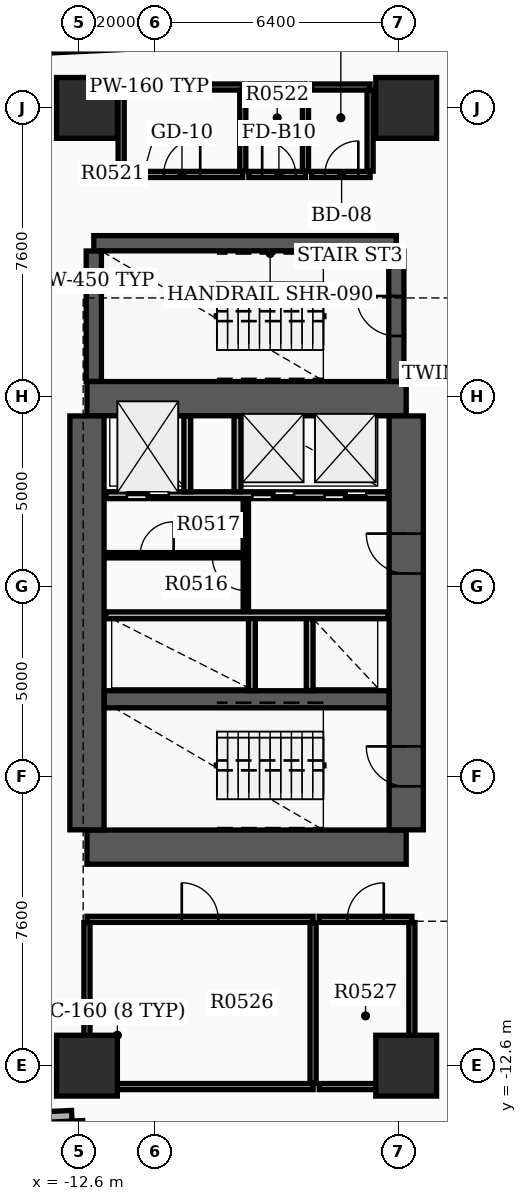
"""IFC4 building model, lengths in metres.
Left out: names, types, materials, properties, quantities, classifications, styles, units other than length and angle.
Written with IfcOpenShell. Run it as: python <this file> out.ifc"""

import sys

from ifc_helpers import new_model, si_unit, direction, frame, frame_2d, origin, origin_2d, place, context, subcontext, project, spatial, rectangle, extrude, element, fill, save


model = new_model("IFC4")
c1 = context("Model", 3, precision=1e-05, world=origin(), true_north=direction((0.0, 1.0)))
c2 = subcontext(c1, "Body", "Model", "MODEL_VIEW")
j1 = project(units=[si_unit("LENGTHUNIT", "METRE"), si_unit("PLANEANGLEUNIT", "RADIAN")], contexts=[c1])
p1 = place(None, origin())
s1 = spatial("IfcSite", under=j1, at=p1, CompositionType="ELEMENT")
p2 = place(p1, origin())
s2 = spatial("IfcBuilding", under=s1, at=p2, CompositionType="ELEMENT")
p3 = place(p2, frame((0.0, 0.0, 35.4)))
s3 = spatial("IfcBuildingStorey", under=s2, at=p3, CompositionType="ELEMENT", Elevation=35.4)
for number, where, z_axis, x_axis in (
    (1, (-12.4, -6.85, 0.0), (0.0, 0.0, 1.0), (1.0, 0.0, 0.0)),
    (2, (-12.4, 4.95, 0.0), (0.0, 0.0, 1.0), (1.0, 0.0, 0.0)),
):
    element("IfcWall", number, at=place(p3, frame(where, z_axis=z_axis, x_axis=x_axis)), inside=s3, PredefinedType="SHEAR", context=c2, shape_type="SweptSolid", body=[
        extrude(rectangle(XDim=8.4, YDim=0.9, at=frame_2d((4.2, 0.0))), origin(), (0.0, 0.0, 1.0), 3.7),
    ])
p4 = place(p3, frame((-12.4, -6.395, 0.0), z_axis=(0.0, 0.0, 1.0), x_axis=(0.0, 1.0, 0.0)))
e3 = element("IfcWall", 3, at=p4, inside=s3, PredefinedType="SHEAR", context=c2, shape_type="SweptSolid", body=[
    extrude(rectangle(XDim=10.89, YDim=0.9, at=frame_2d((5.445, 0.0))), origin(), (0.0, 0.0, 1.0), 3.7),
])
p5 = place(p3, frame((-4.0, -6.395, 0.0), z_axis=(0.0, 0.0, 1.0), x_axis=(0.0, 1.0, 0.0)))
e4 = element("IfcWall", 4, at=p5, inside=s3, PredefinedType="SHEAR", context=c2, shape_type="SweptSolid", body=[
    extrude(rectangle(XDim=10.89, YDim=0.9, at=frame_2d((5.445, 0.0))), origin(), (0.0, 0.0, 1.0), 3.7),
])
p6 = place(p5, frame((1.145, 0.0, 0.0)))
e5 = element("IfcOpeningElement", 5, at=p6, cuts=e4, PredefinedType="OPENING", context=c2, shape_type="SweptSolid", body=[
    extrude(rectangle(XDim=1.05, YDim=2.15, at=frame_2d((0.525, 1.075))), frame((0.0, 0.46, 0.0), z_axis=(0.0, -1.0, 0.0), x_axis=(1.0, 0.0, 0.0)), (0.0, 0.0, 1.0), 0.92),
])
p7 = place(p5, frame((6.745, 0.0, 0.0)))
e6 = element("IfcOpeningElement", 6, at=p7, cuts=e4, PredefinedType="OPENING", context=c2, shape_type="SweptSolid", body=[
    extrude(rectangle(XDim=1.05, YDim=2.15, at=frame_2d((0.525, 1.075))), frame((0.0, 0.46, 0.0), z_axis=(0.0, -1.0, 0.0), x_axis=(1.0, 0.0, 0.0)), (0.0, 0.0, 1.0), 0.92),
])
p8 = place(p3, frame((-11.945, -2.96, 0.0), z_axis=(0.0, 0.0, 1.0), x_axis=(1.0, 0.0, 0.0)))
e7 = element("IfcWall", 7, at=p8, inside=s3, PredefinedType="SHEAR", context=c2, shape_type="SweptSolid", body=[
    extrude(rectangle(XDim=7.49, YDim=0.45, at=frame_2d((3.745, 0.0))), origin(), (0.0, 0.0, 1.0), 3.7),
])
p9 = place(p3, frame((-12.22, 9.04, 0.0), z_axis=(0.0, 0.0, 1.0), x_axis=(1.0, 0.0, 0.0)))
e8 = element("IfcWall", 8, at=p9, inside=s3, PredefinedType="SHEAR", context=c2, shape_type="SweptSolid", body=[
    extrude(rectangle(XDim=7.96, YDim=0.4, at=frame_2d((3.98, 0.0))), origin(), (0.0, 0.0, 1.0), 3.7),
])
p10 = place(p3, frame((-12.22, 5.405, 0.0), z_axis=(0.0, 0.0, 1.0), x_axis=(0.0, 1.0, 0.0)))
e9 = element("IfcWall", 9, at=p10, inside=s3, PredefinedType="SHEAR", context=c2, shape_type="SweptSolid", body=[
    extrude(rectangle(XDim=3.43, YDim=0.4, at=frame_2d((1.715, 0.0))), origin(), (0.0, 0.0, 1.0), 3.7),
])
p11 = place(p3, frame((-4.26, 5.405, 0.0), z_axis=(0.0, 0.0, 1.0), x_axis=(0.0, 1.0, 0.0)))
e10 = element("IfcWall", 10, at=p11, inside=s3, PredefinedType="SHEAR", context=c2, shape_type="SweptSolid", body=[
    extrude(rectangle(XDim=3.43, YDim=0.4, at=frame_2d((1.715, 0.0))), origin(), (0.0, 0.0, 1.0), 3.7),
])
p12 = place(p11, frame((1.195, 0.0, 0.0)))
e11 = element("IfcOpeningElement", 11, at=p12, cuts=e10, PredefinedType="OPENING", context=c2, shape_type="SweptSolid", body=[
    extrude(rectangle(XDim=1.05, YDim=2.15, at=frame_2d((0.525, 1.075))), frame((0.0, 0.21, 0.0), z_axis=(0.0, -1.0, 0.0), x_axis=(1.0, 0.0, 0.0)), (0.0, 0.0, 1.0), 0.42),
])
for number, where, z_axis, x_axis in (
    (12, (-12.4, -12.6, 0.0), (0.0, 0.0, 1.0), (1.0, 0.0, 0.0)),
    (13, (-12.4, 12.6, 0.0), (0.0, 0.0, 1.0), (1.0, 0.0, 0.0)),
    (14, (-4.0, -12.6, 0.0), (0.0, 0.0, 1.0), (1.0, 0.0, 0.0)),
    (15, (-4.0, 12.6, 0.0), (0.0, 0.0, 1.0), (1.0, 0.0, 0.0)),
):
    element("IfcColumn", number, at=place(p3, frame(where, z_axis=z_axis, x_axis=x_axis)), inside=s3, PredefinedType="COLUMN", context=c2, shape_type="SweptSolid", body=[
        extrude(rectangle(XDim=1.6, YDim=1.6, at=origin_2d()), origin(), (0.0, 0.0, 1.0), 3.9),
    ])
p13 = place(p3, frame((-13.843, 14.164, 0.0), z_axis=(0.0, 0.0, 1.0), x_axis=(0.998889082162, 0.047123258997, 0.0)))
e16 = element("IfcWall", 16, at=p13, inside=s3, PredefinedType="STANDARD", context=c2, shape_type="SweptSolid", body=[
    extrude(rectangle(XDim=6.3, YDim=0.28, at=frame_2d((3.15, 0.0))), origin(), (0.0, 0.0, 1.0), 2.91),
])
p14 = place(p3, frame((-14.017, -13.976, 0.0), z_axis=(0.0, 0.0, 1.0), x_axis=(0.998883930236, 0.047232339719, 0.0)))
e17 = element("IfcWall", 17, at=p14, inside=s3, PredefinedType="STANDARD", context=c2, shape_type="SweptSolid", body=[
    extrude(rectangle(XDim=1.22, YDim=0.28, at=frame_2d((0.61, 0.0))), origin(), (0.0, 0.0, 1.0), 2.91),
])
p15 = place(p3, frame((-12.652, -14.052, 0.0), z_axis=(0.0, 0.0, 1.0), x_axis=(0.047039284441, -0.99889304018, 0.0)))
e18 = element("IfcWall", 18, at=p15, inside=s3, PredefinedType="STANDARD", context=c2, shape_type="SweptSolid", body=[
    extrude(rectangle(XDim=1.5, YDim=0.28, at=frame_2d((0.75, 0.0))), origin(), (0.0, 0.0, 1.0), 2.91),
])
p16 = place(p3, frame((-11.9, 2.41, 0.0), z_axis=(0.0, 0.0, 1.0), x_axis=(1.0, 0.0, 0.0)))
e19 = element("IfcWall", 19, at=p16, inside=s3, PredefinedType="SOLIDWALL", context=c2, shape_type="SweptSolid", body=[
    extrude(rectangle(XDim=7.42, YDim=0.18, at=frame_2d((3.71, 0.0))), origin(), (0.0, 0.0, 1.0), 2.9),
])
p17 = place(p16, frame((0.55, 0.0, 0.0)))
e20 = element("IfcOpeningElement", 20, at=p17, cuts=e19, PredefinedType="OPENING", context=c2, shape_type="SweptSolid", body=[
    extrude(rectangle(XDim=1.1, YDim=2.15, at=frame_2d((0.55, 1.075))), frame((0.0, 0.1, 0.0), z_axis=(0.0, -1.0, 0.0), x_axis=(1.0, 0.0, 0.0)), (0.0, 0.0, 1.0), 0.2),
])
p18 = place(p16, frame((3.85, 0.0, 0.0)))
e21 = element("IfcOpeningElement", 21, at=p18, cuts=e19, PredefinedType="OPENING", context=c2, shape_type="SweptSolid", body=[
    extrude(rectangle(XDim=1.1, YDim=2.15, at=frame_2d((0.55, 1.075))), frame((0.0, 0.1, 0.0), z_axis=(0.0, -1.0, 0.0), x_axis=(1.0, 0.0, 0.0)), (0.0, 0.0, 1.0), 0.2),
])
p19 = place(p16, frame((5.75, 0.0, 0.0)))
e22 = element("IfcOpeningElement", 22, at=p19, cuts=e19, PredefinedType="OPENING", context=c2, shape_type="SweptSolid", body=[
    extrude(rectangle(XDim=1.1, YDim=2.15, at=frame_2d((0.55, 1.075))), frame((0.0, 0.1, 0.0), z_axis=(0.0, -1.0, 0.0), x_axis=(1.0, 0.0, 0.0)), (0.0, 0.0, 1.0), 0.2),
])
p20 = place(p3, frame((-11.9, -0.75, 0.0), z_axis=(0.0, 0.0, 1.0), x_axis=(1.0, 0.0, 0.0)))
e23 = element("IfcWall", 23, at=p20, inside=s3, PredefinedType="SOLIDWALL", context=c2, shape_type="SweptSolid", body=[
    extrude(rectangle(XDim=7.42, YDim=0.18, at=frame_2d((3.71, 0.0))), origin(), (0.0, 0.0, 1.0), 2.9),
])
for number, where, z_axis, x_axis in (
    (24, (-9.76, 2.5, 0.0), (0.0, 0.0, 1.0), (0.0, 1.0, 0.0)),
    (25, (-8.44, 2.5, 0.0), (0.0, 0.0, 1.0), (0.0, 1.0, 0.0)),
):
    element("IfcWall", number, at=place(p3, frame(where, z_axis=z_axis, x_axis=x_axis)), inside=s3, PredefinedType="SOLIDWALL", context=c2, shape_type="SweptSolid", body=[
        extrude(rectangle(XDim=1.99, YDim=0.18, at=frame_2d((0.995, 0.0))), origin(), (0.0, 0.0, 1.0), 2.9),
    ])
for number, where, z_axis, x_axis in (
    (26, (-8.06, -2.73, 0.0), (0.0, 0.0, 1.0), (0.0, 1.0, 0.0)),
    (27, (-6.54, -2.73, 0.0), (0.0, 0.0, 1.0), (0.0, 1.0, 0.0)),
):
    element("IfcWall", number, at=place(p3, frame(where, z_axis=z_axis, x_axis=x_axis)), inside=s3, PredefinedType="SOLIDWALL", context=c2, shape_type="SweptSolid", body=[
        extrude(rectangle(XDim=1.89, YDim=0.18, at=frame_2d((0.945, 0.0))), origin(), (0.0, 0.0, 1.0), 2.9),
    ])
p21 = place(p3, frame((-8.22, -0.65, 0.0), z_axis=(0.0, 0.0, 1.0), x_axis=(0.0, 1.0, 0.0)))
e28 = element("IfcWall", 28, at=p21, inside=s3, PredefinedType="SOLIDWALL", context=c2, shape_type="SweptSolid", body=[
    extrude(rectangle(XDim=2.96, YDim=0.14, at=frame_2d((1.48, 0.0))), origin(), (0.0, 0.0, 1.0), 2.9),
])
p22 = place(p21, frame((0.55, 0.0, 0.0)))
e29 = element("IfcOpeningElement", 29, at=p22, cuts=e28, PredefinedType="OPENING", context=c2, shape_type="SweptSolid", body=[
    extrude(rectangle(XDim=0.88, YDim=2.1, at=frame_2d((0.44, 1.05))), frame((0.0, 0.08, 0.0), z_axis=(0.0, -1.0, 0.0), x_axis=(1.0, 0.0, 0.0)), (0.0, 0.0, 1.0), 0.16),
])
p23 = place(p3, frame((-11.85, 0.83, 0.0), z_axis=(0.0, 0.0, 1.0), x_axis=(1.0, 0.0, 0.0)))
e30 = element("IfcWall", 30, at=p23, inside=s3, PredefinedType="PARTITIONING", context=c2, shape_type="SweptSolid", body=[
    extrude(rectangle(XDim=3.552, YDim=0.14, at=frame_2d((1.776, 0.0))), origin(), (0.0, 0.0, 1.0), 2.9),
])
p24 = place(p23, frame((0.85, 0.0, 0.0)))
e31 = element("IfcOpeningElement", 31, at=p24, cuts=e30, PredefinedType="OPENING", context=c2, shape_type="SweptSolid", body=[
    extrude(rectangle(XDim=0.88, YDim=2.1, at=frame_2d((0.44, 1.05))), frame((0.0, 0.08, 0.0), z_axis=(0.0, -1.0, 0.0), x_axis=(1.0, 0.0, 0.0)), (0.0, 0.0, 1.0), 0.16),
])
p25 = place(p3, frame((-11.5, 10.85, 0.0), z_axis=(0.0, 0.0, 1.0), x_axis=(1.0, 0.0, 0.0)))
e32 = element("IfcWall", 32, at=p25, inside=s3, PredefinedType="PARTITIONING", context=c2, shape_type="SweptSolid", body=[
    extrude(rectangle(XDim=3.2, YDim=0.16, at=frame_2d((1.6, 0.0))), origin(), (0.0, 0.0, 1.0), 2.9),
])
p26 = place(p25, frame((1.12, 0.0, 0.0)))
e33 = element("IfcOpeningElement", 33, at=p26, cuts=e32, PredefinedType="OPENING", context=c2, shape_type="SweptSolid", body=[
    extrude(rectangle(XDim=0.96, YDim=2.15, at=frame_2d((0.48, 1.075))), frame((0.0, 0.09, 0.0), z_axis=(0.0, -1.0, 0.0), x_axis=(1.0, 0.0, 0.0)), (0.0, 0.0, 1.0), 0.18),
])
p27 = place(p3, frame((-11.5, 13.15, 0.0), z_axis=(0.0, 0.0, 1.0), x_axis=(1.0, 0.0, 0.0)))
e34 = element("IfcWall", 34, at=p27, inside=s3, PredefinedType="PARTITIONING", context=c2, shape_type="SweptSolid", body=[
    extrude(rectangle(XDim=3.2, YDim=0.16, at=frame_2d((1.6, 0.0))), origin(), (0.0, 0.0, 1.0), 2.9),
])
for number, where, z_axis, x_axis in (
    (35, (-11.5, 10.935, 0.0), (0.0, 0.0, 1.0), (0.0, 1.0, 0.0)),
    (36, (-8.3, 10.935, 0.0), (0.0, 0.0, 1.0), (0.0, 1.0, 0.0)),
):
    element("IfcWall", number, at=place(p3, frame(where, z_axis=z_axis, x_axis=x_axis)), inside=s3, PredefinedType="PARTITIONING", context=c2, shape_type="SweptSolid", body=[
        extrude(rectangle(XDim=2.13, YDim=0.16, at=frame_2d((1.065, 0.0))), origin(), (0.0, 0.0, 1.0), 2.9),
    ])
p28 = place(p3, frame((-8.14, 10.85, 0.0), z_axis=(0.0, 0.0, 1.0), x_axis=(1.0, 0.0, 0.0)))
e37 = element("IfcWall", 37, at=p28, inside=s3, PredefinedType="PARTITIONING", context=c2, shape_type="SweptSolid", body=[
    extrude(rectangle(XDim=1.49, YDim=0.16, at=frame_2d((0.745, 0.0))), origin(), (0.0, 0.0, 1.0), 2.9),
])
p29 = place(p28, frame((0.35, 0.0, 0.0)))
e38 = element("IfcOpeningElement", 38, at=p29, cuts=e37, PredefinedType="OPENING", context=c2, shape_type="SweptSolid", body=[
    extrude(rectangle(XDim=0.88, YDim=2.1, at=frame_2d((0.44, 1.05))), frame((0.0, 0.09, 0.0), z_axis=(0.0, -1.0, 0.0), x_axis=(1.0, 0.0, 0.0)), (0.0, 0.0, 1.0), 0.18),
])
p30 = place(p3, frame((-8.14, 13.15, 0.0), z_axis=(0.0, 0.0, 1.0), x_axis=(1.0, 0.0, 0.0)))
e39 = element("IfcWall", 39, at=p30, inside=s3, PredefinedType="PARTITIONING", context=c2, shape_type="SweptSolid", body=[
    extrude(rectangle(XDim=1.49, YDim=0.16, at=frame_2d((0.745, 0.0))), origin(), (0.0, 0.0, 1.0), 2.9),
])
p31 = place(p3, frame((-6.65, 10.935, 0.0), z_axis=(0.0, 0.0, 1.0), x_axis=(0.0, 1.0, 0.0)))
e40 = element("IfcWall", 40, at=p31, inside=s3, PredefinedType="PARTITIONING", context=c2, shape_type="SweptSolid", body=[
    extrude(rectangle(XDim=2.13, YDim=0.16, at=frame_2d((1.065, 0.0))), origin(), (0.0, 0.0, 1.0), 2.9),
])
p32 = place(p3, frame((-6.49, 10.85, 0.0), z_axis=(0.0, 0.0, 1.0), x_axis=(1.0, 0.0, 0.0)))
e41 = element("IfcWall", 41, at=p32, inside=s3, PredefinedType="PARTITIONING", context=c2, shape_type="SweptSolid", body=[
    extrude(rectangle(XDim=1.54, YDim=0.16, at=frame_2d((0.77, 0.0))), origin(), (0.0, 0.0, 1.0), 2.9),
])
p33 = place(p32, frame((0.35, 0.0, 0.0)))
e42 = element("IfcOpeningElement", 42, at=p33, cuts=e41, PredefinedType="OPENING", context=c2, shape_type="SweptSolid", body=[
    extrude(rectangle(XDim=0.88, YDim=2.15, at=frame_2d((0.44, 1.075))), frame((0.0, 0.09, 0.0), z_axis=(0.0, -1.0, 0.0), x_axis=(1.0, 0.0, 0.0)), (0.0, 0.0, 1.0), 0.18),
])
p34 = place(p3, frame((-6.49, 13.15, 0.0), z_axis=(0.0, 0.0, 1.0), x_axis=(1.0, 0.0, 0.0)))
e43 = element("IfcWall", 43, at=p34, inside=s3, PredefinedType="PARTITIONING", context=c2, shape_type="SweptSolid", body=[
    extrude(rectangle(XDim=1.54, YDim=0.16, at=frame_2d((0.77, 0.0))), origin(), (0.0, 0.0, 1.0), 2.9),
])
p35 = place(p3, frame((-4.95, 10.935, 0.0), z_axis=(0.0, 0.0, 1.0), x_axis=(0.0, 1.0, 0.0)))
e44 = element("IfcWall", 44, at=p35, inside=s3, PredefinedType="PARTITIONING", context=c2, shape_type="SweptSolid", body=[
    extrude(rectangle(XDim=2.13, YDim=0.16, at=frame_2d((1.065, 0.0))), origin(), (0.0, 0.0, 1.0), 2.9),
])
p36 = place(p3, frame((-12.4, -13.15, 0.0), z_axis=(0.0, 0.0, 1.0), x_axis=(1.0, 0.0, 0.0)))
e45 = element("IfcWall", 45, at=p36, inside=s3, PredefinedType="PARTITIONING", context=c2, shape_type="SweptSolid", body=[
    extrude(rectangle(XDim=5.95, YDim=0.16, at=frame_2d((2.975, 0.0))), origin(), (0.0, 0.0, 1.0), 2.9),
])
p37 = place(p3, frame((-12.4, -8.75, 0.0), z_axis=(0.0, 0.0, 1.0), x_axis=(1.0, 0.0, 0.0)))
e46 = element("IfcWall", 46, at=p37, inside=s3, PredefinedType="PARTITIONING", context=c2, shape_type="SweptSolid", body=[
    extrude(rectangle(XDim=5.95, YDim=0.16, at=frame_2d((2.975, 0.0))), origin(), (0.0, 0.0, 1.0), 2.9),
])
p38 = place(p37, frame((2.495, 0.0, 0.0)))
e47 = element("IfcOpeningElement", 47, at=p38, cuts=e46, PredefinedType="OPENING", context=c2, shape_type="SweptSolid", body=[
    extrude(rectangle(XDim=0.96, YDim=2.15, at=frame_2d((0.48, 1.075))), frame((0.0, 0.09, 0.0), z_axis=(0.0, -1.0, 0.0), x_axis=(1.0, 0.0, 0.0)), (0.0, 0.0, 1.0), 0.18),
])
for number, where, z_axis, x_axis in (
    (48, (-12.4, -13.065, 0.0), (0.0, 0.0, 1.0), (0.0, 1.0, 0.0)),
    (49, (-6.45, -13.065, 0.0), (0.0, 0.0, 1.0), (0.0, 1.0, 0.0)),
):
    element("IfcWall", number, at=place(p3, frame(where, z_axis=z_axis, x_axis=x_axis)), inside=s3, PredefinedType="PARTITIONING", context=c2, shape_type="SweptSolid", body=[
        extrude(rectangle(XDim=4.23, YDim=0.16, at=frame_2d((2.115, 0.0))), origin(), (0.0, 0.0, 1.0), 2.9),
    ])
p39 = place(p3, frame((-6.29, -13.15, 0.0), z_axis=(0.0, 0.0, 1.0), x_axis=(1.0, 0.0, 0.0)))
e50 = element("IfcWall", 50, at=p39, inside=s3, PredefinedType="PARTITIONING", context=c2, shape_type="SweptSolid", body=[
    extrude(rectangle(XDim=2.44, YDim=0.16, at=frame_2d((1.22, 0.0))), origin(), (0.0, 0.0, 1.0), 2.9),
])
p40 = place(p3, frame((-6.29, -8.75, 0.0), z_axis=(0.0, 0.0, 1.0), x_axis=(1.0, 0.0, 0.0)))
e51 = element("IfcWall", 51, at=p40, inside=s3, PredefinedType="PARTITIONING", context=c2, shape_type="SweptSolid", body=[
    extrude(rectangle(XDim=2.44, YDim=0.16, at=frame_2d((1.22, 0.0))), origin(), (0.0, 0.0, 1.0), 2.9),
])
p41 = place(p40, frame((0.74, 0.0, 0.0)))
e52 = element("IfcOpeningElement", 52, at=p41, cuts=e51, PredefinedType="OPENING", context=c2, shape_type="SweptSolid", body=[
    extrude(rectangle(XDim=0.96, YDim=2.15, at=frame_2d((0.48, 1.075))), frame((0.0, 0.09, 0.0), z_axis=(0.0, -1.0, 0.0), x_axis=(1.0, 0.0, 0.0)), (0.0, 0.0, 1.0), 0.18),
])
p42 = place(p3, frame((-3.85, -13.065, 0.0), z_axis=(0.0, 0.0, 1.0), x_axis=(0.0, 1.0, 0.0)))
e53 = element("IfcWall", 53, at=p42, inside=s3, PredefinedType="PARTITIONING", context=c2, shape_type="SweptSolid", body=[
    extrude(rectangle(XDim=4.23, YDim=0.16, at=frame_2d((2.115, 0.0))), origin(), (0.0, 0.0, 1.0), 2.9),
])
p43 = place(p6, origin())
e54 = element("IfcDoor", 54, at=p43, inside=s3, OperationType="SINGLE_SWING_RIGHT", PredefinedType="DOOR", context=c2, shape_type="SweptSolid", body=[
    extrude(rectangle(XDim=1.05, YDim=2.15, at=frame_2d((0.525, 1.075))), frame((0.0, 0.025, 0.0), z_axis=(0.0, -1.0, 0.0), x_axis=(1.0, 0.0, 0.0)), (0.0, 0.0, 1.0), 0.05),
])
fill(e5, e54)
p44 = place(p7, origin())
e55 = element("IfcDoor", 55, at=p44, inside=s3, OperationType="SINGLE_SWING_RIGHT", PredefinedType="DOOR", context=c2, shape_type="SweptSolid", body=[
    extrude(rectangle(XDim=1.05, YDim=2.15, at=frame_2d((0.525, 1.075))), frame((0.0, 0.025, 0.0), z_axis=(0.0, -1.0, 0.0), x_axis=(1.0, 0.0, 0.0)), (0.0, 0.0, 1.0), 0.05),
])
fill(e6, e55)
p45 = place(p12, origin())
e56 = element("IfcDoor", 56, at=p45, inside=s3, OperationType="SINGLE_SWING_RIGHT", PredefinedType="DOOR", context=c2, shape_type="SweptSolid", body=[
    extrude(rectangle(XDim=1.05, YDim=2.15, at=frame_2d((0.525, 1.075))), frame((0.0, 0.025, 0.0), z_axis=(0.0, -1.0, 0.0), x_axis=(1.0, 0.0, 0.0)), (0.0, 0.0, 1.0), 0.05),
])
fill(e11, e56)
p46 = place(p17, origin())
e57 = element("IfcDoor", 57, at=p46, inside=s3, OperationType="DOUBLE_DOOR_SLIDING", PredefinedType="DOOR", context=c2, shape_type="SweptSolid", body=[
    extrude(rectangle(XDim=1.1, YDim=2.15, at=frame_2d((0.55, 1.075))), frame((0.0, 0.025, 0.0), z_axis=(0.0, -1.0, 0.0), x_axis=(1.0, 0.0, 0.0)), (0.0, 0.0, 1.0), 0.05),
])
fill(e20, e57)
p47 = place(p18, origin())
e58 = element("IfcDoor", 58, at=p47, inside=s3, OperationType="DOUBLE_DOOR_SLIDING", PredefinedType="DOOR", context=c2, shape_type="SweptSolid", body=[
    extrude(rectangle(XDim=1.1, YDim=2.15, at=frame_2d((0.55, 1.075))), frame((0.0, 0.025, 0.0), z_axis=(0.0, -1.0, 0.0), x_axis=(1.0, 0.0, 0.0)), (0.0, 0.0, 1.0), 0.05),
])
fill(e21, e58)
p48 = place(p19, origin())
e59 = element("IfcDoor", 59, at=p48, inside=s3, OperationType="DOUBLE_DOOR_SLIDING", PredefinedType="DOOR", context=c2, shape_type="SweptSolid", body=[
    extrude(rectangle(XDim=1.1, YDim=2.15, at=frame_2d((0.55, 1.075))), frame((0.0, 0.025, 0.0), z_axis=(0.0, -1.0, 0.0), x_axis=(1.0, 0.0, 0.0)), (0.0, 0.0, 1.0), 0.05),
])
fill(e22, e59)
p49 = place(p22, origin())
e60 = element("IfcDoor", 60, at=p49, inside=s3, OperationType="SINGLE_SWING_RIGHT", PredefinedType="DOOR", context=c2, shape_type="SweptSolid", body=[
    extrude(rectangle(XDim=0.88, YDim=2.1, at=frame_2d((0.44, 1.05))), frame((0.0, 0.025, 0.0), z_axis=(0.0, -1.0, 0.0), x_axis=(1.0, 0.0, 0.0)), (0.0, 0.0, 1.0), 0.05),
])
fill(e29, e60)
p50 = place(p24, origin())
e61 = element("IfcDoor", 61, at=p50, inside=s3, OperationType="SINGLE_SWING_RIGHT", PredefinedType="DOOR", context=c2, shape_type="SweptSolid", body=[
    extrude(rectangle(XDim=0.88, YDim=2.1, at=frame_2d((0.44, 1.05))), frame((0.0, 0.025, 0.0), z_axis=(0.0, -1.0, 0.0), x_axis=(1.0, 0.0, 0.0)), (0.0, 0.0, 1.0), 0.05),
])
fill(e31, e61)
p51 = place(p26, origin())
e62 = element("IfcDoor", 62, at=p51, inside=s3, OperationType="SINGLE_SWING_RIGHT", PredefinedType="DOOR", context=c2, shape_type="SweptSolid", body=[
    extrude(rectangle(XDim=0.96, YDim=2.15, at=frame_2d((0.48, 1.075))), frame((0.0, 0.025, 0.0), z_axis=(0.0, -1.0, 0.0), x_axis=(1.0, 0.0, 0.0)), (0.0, 0.0, 1.0), 0.05),
])
fill(e33, e62)
p52 = place(p29, origin())
e63 = element("IfcDoor", 63, at=p52, inside=s3, OperationType="SINGLE_SWING_LEFT", PredefinedType="DOOR", context=c2, shape_type="SweptSolid", body=[
    extrude(rectangle(XDim=0.88, YDim=2.1, at=frame_2d((0.44, 1.05))), frame((0.0, 0.025, 0.0), z_axis=(0.0, -1.0, 0.0), x_axis=(1.0, 0.0, 0.0)), (0.0, 0.0, 1.0), 0.05),
])
fill(e38, e63)
p53 = place(p33, origin())
e64 = element("IfcDoor", 64, at=p53, inside=s3, OperationType="SINGLE_SWING_RIGHT", PredefinedType="DOOR", context=c2, shape_type="SweptSolid", body=[
    extrude(rectangle(XDim=0.88, YDim=2.15, at=frame_2d((0.44, 1.075))), frame((0.0, 0.025, 0.0), z_axis=(0.0, -1.0, 0.0), x_axis=(1.0, 0.0, 0.0)), (0.0, 0.0, 1.0), 0.05),
])
fill(e42, e64)
p54 = place(p38, origin())
e65 = element("IfcDoor", 65, at=p54, inside=s3, OperationType="SINGLE_SWING_LEFT", PredefinedType="DOOR", context=c2, shape_type="SweptSolid", body=[
    extrude(rectangle(XDim=0.96, YDim=2.15, at=frame_2d((0.48, 1.075))), frame((0.0, 0.025, 0.0), z_axis=(0.0, -1.0, 0.0), x_axis=(1.0, 0.0, 0.0)), (0.0, 0.0, 1.0), 0.05),
])
fill(e47, e65)
p55 = place(p41, origin())
e66 = element("IfcDoor", 66, at=p55, inside=s3, OperationType="SINGLE_SWING_RIGHT", PredefinedType="DOOR", context=c2, shape_type="SweptSolid", body=[
    extrude(rectangle(XDim=0.96, YDim=2.15, at=frame_2d((0.48, 1.075))), frame((0.0, 0.025, 0.0), z_axis=(0.0, -1.0, 0.0), x_axis=(1.0, 0.0, 0.0)), (0.0, 0.0, 1.0), 0.05),
])
fill(e52, e66)
save(model, sys.argv[1])
